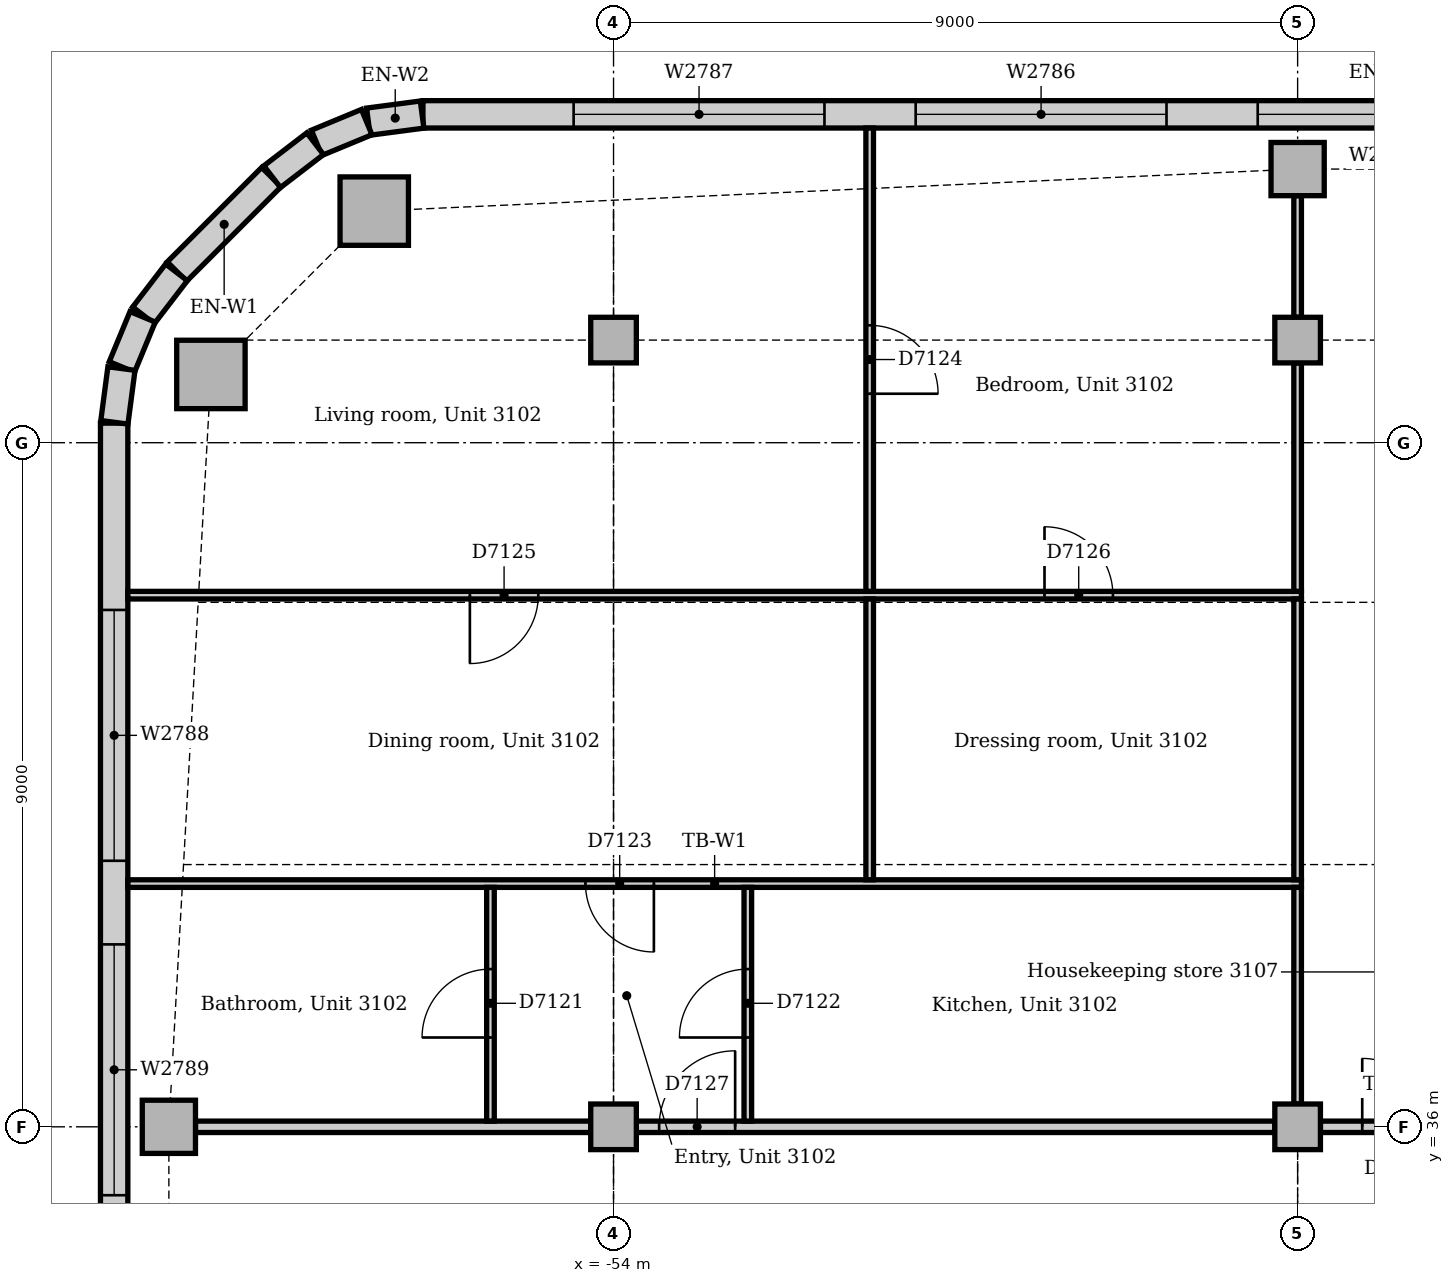
"""IFC4 building model, lengths in metres.
Left out: names, types, materials, properties, quantities, classifications, styles, units other than length and angle.
Written with IfcOpenShell. Run it as: python <this file> out.ifc"""

import sys

from ifc_helpers import new_model, si_unit, direction, frame, frame_2d, origin, origin_2d, place, context, subcontext, project, spatial, rectangle, extrude, element, fill, save


model = new_model("IFC4")
c1 = context("Model", 3, precision=1e-05, world=origin(), true_north=direction((0.0, 1.0)))
c2 = subcontext(c1, "Body", "Model", "MODEL_VIEW")
j1 = project(units=[si_unit("LENGTHUNIT", "METRE"), si_unit("PLANEANGLEUNIT", "RADIAN")], contexts=[c1])
p1 = place(None, origin())
s1 = spatial("IfcSite", under=j1, at=p1, CompositionType="ELEMENT")
p2 = place(p1, origin())
s2 = spatial("IfcBuilding", under=s1, at=p2, CompositionType="ELEMENT")
p3 = place(p2, frame((0.0, 0.0, 132.0)))
s3 = spatial("IfcBuildingStorey", under=s2, at=p3, CompositionType="ELEMENT", Elevation=132.0)
for number, where, z_axis, x_axis in (
    (1, (-57.148, 48.047, 0.0), (0.0, 0.0, 1.0), (1.0, 0.0, 0.0)),
    (2, (-59.297, 45.898, 0.0), (0.0, 0.0, 1.0), (1.0, 0.0, 0.0)),
):
    element("IfcColumn", number, at=place(p3, frame(where, z_axis=z_axis, x_axis=x_axis)), inside=s3, PredefinedType="COLUMN", context=c2, shape_type="SweptSolid", body=[
        extrude(rectangle(XDim=0.9, YDim=0.9, at=origin_2d()), origin(), (0.0, 0.0, 1.0), 3.85),
    ])
for number, where, z_axis, x_axis in (
    (3, (-45.0, 48.6, 0.0), (0.0, 0.0, 1.0), (1.0, 0.0, 0.0)),
    (4, (-59.85, 36.0, 0.0), (0.0, 0.0, 1.0), (1.0, 0.0, 0.0)),
):
    element("IfcColumn", number, at=place(p3, frame(where, z_axis=z_axis, x_axis=x_axis)), inside=s3, PredefinedType="COLUMN", context=c2, shape_type="SweptSolid", body=[
        extrude(rectangle(XDim=0.7, YDim=0.7, at=origin_2d()), origin(), (0.0, 0.0, 1.0), 3.85),
    ])
for number, where, z_axis, x_axis in (
    (5, (-54.0, 36.0, 0.0), (0.0, 0.0, 1.0), (1.0, 0.0, 0.0)),
    (6, (-54.0, 46.35, 0.0), (0.0, 0.0, 1.0), (1.0, 0.0, 0.0)),
    (7, (-45.0, 36.0, 0.0), (0.0, 0.0, 1.0), (1.0, 0.0, 0.0)),
    (8, (-45.0, 46.35, 0.0), (0.0, 0.0, 1.0), (1.0, 0.0, 0.0)),
):
    element("IfcColumn", number, at=place(p3, frame(where, z_axis=z_axis, x_axis=x_axis)), inside=s3, PredefinedType="COLUMN", context=c2, shape_type="SweptSolid", body=[
        extrude(rectangle(XDim=0.6, YDim=0.6, at=origin_2d()), origin(), (0.0, 0.0, 1.0), 3.85),
    ])
p4 = place(p3, frame((-31.243, 49.32, 0.0), z_axis=(0.0, 0.0, 1.0), x_axis=(-1.0, 0.0, 0.0)))
e9 = element("IfcWall", 9, at=p4, inside=s3, PredefinedType="STANDARD", context=c2, shape_type="SweptSolid", body=[
    extrude(rectangle(XDim=25.265, YDim=0.36, at=frame_2d((12.632, 0.0))), origin(), (0.0, 0.0, 1.0), 3.85),
])
p5 = place(p4, frame((1.982, 0.0, 0.9)))
e10 = element("IfcOpeningElement", 10, at=p5, cuts=e9, PredefinedType="OPENING", context=c2, shape_type="SweptSolid", body=[
    extrude(rectangle(XDim=3.3, YDim=1.6, at=frame_2d((1.65, 0.8))), frame((0.0, 0.19, 0.0), z_axis=(0.0, -1.0, 0.0), x_axis=(1.0, 0.0, 0.0)), (0.0, 0.0, 1.0), 0.38),
])
p6 = place(p4, frame((6.482, 0.0, 0.9)))
e11 = element("IfcOpeningElement", 11, at=p6, cuts=e9, PredefinedType="OPENING", context=c2, shape_type="SweptSolid", body=[
    extrude(rectangle(XDim=3.3, YDim=1.6, at=frame_2d((1.65, 0.8))), frame((0.0, 0.19, 0.0), z_axis=(0.0, -1.0, 0.0), x_axis=(1.0, 0.0, 0.0)), (0.0, 0.0, 1.0), 0.38),
])
p7 = place(p4, frame((10.982, 0.0, 0.9)))
e12 = element("IfcOpeningElement", 12, at=p7, cuts=e9, PredefinedType="OPENING", context=c2, shape_type="SweptSolid", body=[
    extrude(rectangle(XDim=3.3, YDim=1.6, at=frame_2d((1.65, 0.8))), frame((0.0, 0.19, 0.0), z_axis=(0.0, -1.0, 0.0), x_axis=(1.0, 0.0, 0.0)), (0.0, 0.0, 1.0), 0.38),
])
p8 = place(p4, frame((15.482, 0.0, 0.9)))
e13 = element("IfcOpeningElement", 13, at=p8, cuts=e9, PredefinedType="OPENING", context=c2, shape_type="SweptSolid", body=[
    extrude(rectangle(XDim=3.3, YDim=1.6, at=frame_2d((1.65, 0.8))), frame((0.0, 0.19, 0.0), z_axis=(0.0, -1.0, 0.0), x_axis=(1.0, 0.0, 0.0)), (0.0, 0.0, 1.0), 0.38),
])
p9 = place(p4, frame((19.982, 0.0, 0.9)))
e14 = element("IfcOpeningElement", 14, at=p9, cuts=e9, PredefinedType="OPENING", context=c2, shape_type="SweptSolid", body=[
    extrude(rectangle(XDim=3.3, YDim=1.6, at=frame_2d((1.65, 0.8))), frame((0.0, 0.19, 0.0), z_axis=(0.0, -1.0, 0.0), x_axis=(1.0, 0.0, 0.0)), (0.0, 0.0, 1.0), 0.38),
])
p10 = place(p3, frame((-58.501, 48.494, 0.0), z_axis=(0.0, 0.0, 1.0), x_axis=(-0.707106781187, -0.707106781187, 0.0)))
e15 = element("IfcWall", 15, at=p10, inside=s3, PredefinedType="STANDARD", context=c2, shape_type="SweptSolid", body=[
    extrude(rectangle(XDim=1.757, YDim=0.36, at=frame_2d((0.879, 0.0))), origin(), (0.0, 0.0, 1.0), 3.85),
])
p11 = place(p3, frame((-60.57, 45.257, 0.0), z_axis=(0.0, 0.0, 1.0), x_axis=(0.0, -1.0, 0.0)))
e16 = element("IfcWall", 16, at=p11, inside=s3, PredefinedType="STANDARD", context=c2, shape_type="SweptSolid", body=[
    extrude(rectangle(XDim=21.515, YDim=0.36, at=frame_2d((10.757, 0.0))), origin(), (0.0, 0.0, 1.0), 3.85),
])
p12 = place(p11, frame((2.457, 0.0, 0.9)))
e17 = element("IfcOpeningElement", 17, at=p12, cuts=e16, PredefinedType="OPENING", context=c2, shape_type="SweptSolid", body=[
    extrude(rectangle(XDim=3.3, YDim=1.6, at=frame_2d((1.65, 0.8))), frame((0.0, 0.19, 0.0), z_axis=(0.0, -1.0, 0.0), x_axis=(1.0, 0.0, 0.0)), (0.0, 0.0, 1.0), 0.38),
])
p13 = place(p11, frame((6.857, 0.0, 0.9)))
e18 = element("IfcOpeningElement", 18, at=p13, cuts=e16, PredefinedType="OPENING", context=c2, shape_type="SweptSolid", body=[
    extrude(rectangle(XDim=3.3, YDim=1.6, at=frame_2d((1.65, 0.8))), frame((0.0, 0.19, 0.0), z_axis=(0.0, -1.0, 0.0), x_axis=(1.0, 0.0, 0.0)), (0.0, 0.0, 1.0), 0.38),
])
p14 = place(p11, frame((11.357, 0.0, 0.9)))
e19 = element("IfcOpeningElement", 19, at=p14, cuts=e16, PredefinedType="OPENING", context=c2, shape_type="SweptSolid", body=[
    extrude(rectangle(XDim=3.3, YDim=1.6, at=frame_2d((1.65, 0.8))), frame((0.0, 0.19, 0.0), z_axis=(0.0, -1.0, 0.0), x_axis=(1.0, 0.0, 0.0)), (0.0, 0.0, 1.0), 0.38),
])
p15 = place(p11, frame((15.857, 0.0, 0.9)))
e20 = element("IfcOpeningElement", 20, at=p15, cuts=e16, PredefinedType="OPENING", context=c2, shape_type="SweptSolid", body=[
    extrude(rectangle(XDim=3.3, YDim=1.6, at=frame_2d((1.65, 0.8))), frame((0.0, 0.19, 0.0), z_axis=(0.0, -1.0, 0.0), x_axis=(1.0, 0.0, 0.0)), (0.0, 0.0, 1.0), 0.38),
])
for number, where, z_axis, x_axis in (
    (21, (-56.519, 49.317, 0.0), (0.0, 0.0, 1.0), (-0.991, -0.131, 0.0)),
    (22, (-57.247, 49.218, 0.0), (0.0, 0.0, 1.0), (-0.924, -0.383, 0.0)),
):
    element("IfcWall", number, at=place(p3, frame(where, z_axis=z_axis, x_axis=x_axis)), inside=s3, PredefinedType="STANDARD", context=c2, shape_type="SweptSolid", body=[
        extrude(rectangle(XDim=0.713, YDim=0.36, at=frame_2d((0.356, 0.0))), origin(), (0.0, 0.0, 1.0), 3.85),
    ])
for number, where, z_axis, x_axis in (
    (23, (-57.925, 48.934, 0.0), (0.0, 0.0, 1.0), (-0.793, -0.609, 0.0)),
    (24, (-59.75, 47.241, 0.0), (0.0, 0.0, 1.0), (-0.609, -0.793, 0.0)),
):
    element("IfcWall", number, at=place(p3, frame(where, z_axis=z_axis, x_axis=x_axis)), inside=s3, PredefinedType="STANDARD", context=c2, shape_type="SweptSolid", body=[
        extrude(rectangle(XDim=0.713, YDim=0.36, at=frame_2d((0.357, 0.0))), origin(), (0.0, 0.0, 1.0), 3.85),
    ])
for number, where, z_axis, x_axis in (
    (25, (-60.195, 46.656, 0.0), (0.0, 0.0, 1.0), (-0.383, -0.924, 0.0)),
    (26, (-60.474, 45.976, 0.0), (0.0, 0.0, 1.0), (-0.131, -0.991, 0.0)),
):
    element("IfcWall", number, at=place(p3, frame(where, z_axis=z_axis, x_axis=x_axis)), inside=s3, PredefinedType="STANDARD", context=c2, shape_type="SweptSolid", body=[
        extrude(rectangle(XDim=0.713, YDim=0.36, at=frame_2d((0.356, 0.0))), origin(), (0.0, 0.0, 1.0), 3.85),
    ])
p16 = place(p3, frame((-44.7, 36.0, 0.0), z_axis=(0.0, 0.0, 1.0), x_axis=(1.0, 0.0, 0.0)))
e27 = element("IfcWall", 27, at=p16, inside=s3, PredefinedType="PARTITIONING", context=c2, shape_type="SweptSolid", body=[
    extrude(rectangle(XDim=1.975, YDim=0.15, at=frame_2d((0.988, 0.0))), origin(), (0.0, 0.0, 1.0), 3.602),
])
p17 = place(p16, frame((0.55, 0.0, 0.0)))
e28 = element("IfcOpeningElement", 28, at=p17, cuts=e27, PredefinedType="OPENING", context=c2, shape_type="SweptSolid", body=[
    extrude(rectangle(XDim=0.9, YDim=2.1, at=frame_2d((0.45, 1.05))), frame((0.0, 0.085, 0.0), z_axis=(0.0, -1.0, 0.0), x_axis=(1.0, 0.0, 0.0)), (0.0, 0.0, 1.0), 0.17),
])
p18 = place(p3, frame((-53.7, 36.0, 0.0), z_axis=(0.0, 0.0, 1.0), x_axis=(1.0, 0.0, 0.0)))
e29 = element("IfcWall", 29, at=p18, inside=s3, PredefinedType="PARTITIONING", context=c2, shape_type="SweptSolid", body=[
    extrude(rectangle(XDim=8.4, YDim=0.15, at=frame_2d((4.2, 0.0))), origin(), (0.0, 0.0, 1.0), 3.262),
])
p19 = place(p18, frame((0.3, 0.0, 0.0)))
e30 = element("IfcOpeningElement", 30, at=p19, cuts=e29, PredefinedType="OPENING", context=c2, shape_type="SweptSolid", body=[
    extrude(rectangle(XDim=1.0, YDim=2.1, at=frame_2d((0.5, 1.05))), frame((0.0, 0.085, 0.0), z_axis=(0.0, -1.0, 0.0), x_axis=(1.0, 0.0, 0.0)), (0.0, 0.0, 1.0), 0.17),
])
p20 = place(p3, frame((-59.5, 36.0, 0.0), z_axis=(0.0, 0.0, 1.0), x_axis=(1.0, 0.0, 0.0)))
e31 = element("IfcWall", 31, at=p20, inside=s3, PredefinedType="PARTITIONING", context=c2, shape_type="SweptSolid", body=[
    extrude(rectangle(XDim=5.2, YDim=0.15, at=frame_2d((2.6, 0.0))), origin(), (0.0, 0.0, 1.0), 3.35),
])
p21 = place(p3, frame((-60.39, 39.2, 0.0), z_axis=(0.0, 0.0, 1.0), x_axis=(1.0, 0.0, 0.0)))
e32 = element("IfcWall", 32, at=p21, inside=s3, PredefinedType="PARTITIONING", context=c2, shape_type="SweptSolid", body=[
    extrude(rectangle(XDim=15.44, YDim=0.1, at=frame_2d((7.72, 0.0))), origin(), (0.0, 0.0, 1.0), 3.85),
])
p22 = place(p21, frame((6.021, 0.0, 0.0)))
e33 = element("IfcOpeningElement", 33, at=p22, cuts=e32, PredefinedType="OPENING", context=c2, shape_type="SweptSolid", body=[
    extrude(rectangle(XDim=0.9, YDim=2.1, at=frame_2d((0.45, 1.05))), frame((0.0, 0.06, 0.0), z_axis=(0.0, -1.0, 0.0), x_axis=(1.0, 0.0, 0.0)), (0.0, 0.0, 1.0), 0.12),
])
p23 = place(p3, frame((-60.39, 42.994, 0.0), z_axis=(0.0, 0.0, 1.0), x_axis=(1.0, 0.0, 0.0)))
e34 = element("IfcWall", 34, at=p23, inside=s3, PredefinedType="PARTITIONING", context=c2, shape_type="SweptSolid", body=[
    extrude(rectangle(XDim=15.44, YDim=0.1, at=frame_2d((7.72, 0.0))), origin(), (0.0, 0.0, 1.0), 3.4),
])
p24 = place(p23, frame((4.5, 0.0, 0.0)))
e35 = element("IfcOpeningElement", 35, at=p24, cuts=e34, PredefinedType="OPENING", context=c2, shape_type="SweptSolid", body=[
    extrude(rectangle(XDim=0.9, YDim=2.1, at=frame_2d((0.45, 1.05))), frame((0.0, 0.06, 0.0), z_axis=(0.0, -1.0, 0.0), x_axis=(1.0, 0.0, 0.0)), (0.0, 0.0, 1.0), 0.12),
])
p25 = place(p23, frame((12.06, 0.0, 0.0)))
e36 = element("IfcOpeningElement", 36, at=p25, cuts=e34, PredefinedType="OPENING", context=c2, shape_type="SweptSolid", body=[
    extrude(rectangle(XDim=0.9, YDim=2.1, at=frame_2d((0.45, 1.05))), frame((0.0, 0.06, 0.0), z_axis=(0.0, -1.0, 0.0), x_axis=(1.0, 0.0, 0.0)), (0.0, 0.0, 1.0), 0.12),
])
p26 = place(p3, frame((-45.0, 43.044, 0.0), z_axis=(0.0, 0.0, 1.0), x_axis=(0.0, 1.0, 0.0)))
e37 = element("IfcWall", 37, at=p26, inside=s3, PredefinedType="PARTITIONING", context=c2, shape_type="SweptSolid", body=[
    extrude(rectangle(XDim=3.006, YDim=0.1, at=frame_2d((1.503, 0.0))), origin(), (0.0, 0.0, 1.0), 3.362),
])
p27 = place(p3, frame((-45.0, 39.25, 0.0), z_axis=(0.0, 0.0, 1.0), x_axis=(0.0, 1.0, 0.0)))
e38 = element("IfcWall", 38, at=p27, inside=s3, PredefinedType="PARTITIONING", context=c2, shape_type="SweptSolid", body=[
    extrude(rectangle(XDim=3.694, YDim=0.1, at=frame_2d((1.847, 0.0))), origin(), (0.0, 0.0, 1.0), 3.362),
])
p28 = place(p3, frame((-45.0, 36.3, 0.0), z_axis=(0.0, 0.0, 1.0), x_axis=(0.0, 1.0, 0.0)))
e39 = element("IfcWall", 39, at=p28, inside=s3, PredefinedType="PARTITIONING", context=c2, shape_type="SweptSolid", body=[
    extrude(rectangle(XDim=2.85, YDim=0.1, at=frame_2d((1.425, 0.0))), origin(), (0.0, 0.0, 1.0), 3.362),
])
p29 = place(p3, frame((-45.0, 46.65, 0.0), z_axis=(0.0, 0.0, 1.0), x_axis=(0.0, 1.0, 0.0)))
e40 = element("IfcWall", 40, at=p29, inside=s3, PredefinedType="PARTITIONING", context=c2, shape_type="SweptSolid", body=[
    extrude(rectangle(XDim=1.6, YDim=0.1, at=frame_2d((0.8, 0.0))), origin(), (0.0, 0.0, 1.0), 3.652),
])
p30 = place(p3, frame((-50.63, 39.25, 0.0), z_axis=(0.0, 0.0, 1.0), x_axis=(0.0, 1.0, 0.0)))
e41 = element("IfcWall", 41, at=p30, inside=s3, PredefinedType="PARTITIONING", context=c2, shape_type="SweptSolid", body=[
    extrude(rectangle(XDim=3.694, YDim=0.1, at=frame_2d((1.847, 0.0))), origin(), (0.0, 0.0, 1.0), 3.85),
])
p31 = place(p3, frame((-50.63, 43.044, 0.0), z_axis=(0.0, 0.0, 1.0), x_axis=(0.0, 1.0, 0.0)))
e42 = element("IfcWall", 42, at=p31, inside=s3, PredefinedType="PARTITIONING", context=c2, shape_type="SweptSolid", body=[
    extrude(rectangle(XDim=6.096, YDim=0.1, at=frame_2d((3.048, 0.0))), origin(), (0.0, 0.0, 1.0), 3.85),
])
p32 = place(p31, frame((2.6, 0.0, 0.0)))
e43 = element("IfcOpeningElement", 43, at=p32, cuts=e42, PredefinedType="OPENING", context=c2, shape_type="SweptSolid", body=[
    extrude(rectangle(XDim=0.9, YDim=2.1, at=frame_2d((0.45, 1.05))), frame((0.0, 0.06, 0.0), z_axis=(0.0, -1.0, 0.0), x_axis=(1.0, 0.0, 0.0)), (0.0, 0.0, 1.0), 0.12),
])
p33 = place(p3, frame((-55.619, 36.075, 0.0), z_axis=(0.0, 0.0, 1.0), x_axis=(0.0, 1.0, 0.0)))
e44 = element("IfcWall", 44, at=p33, inside=s3, PredefinedType="PARTITIONING", context=c2, shape_type="SweptSolid", body=[
    extrude(rectangle(XDim=3.075, YDim=0.1, at=frame_2d((1.538, 0.0))), origin(), (0.0, 0.0, 1.0), 3.85),
])
p34 = place(p33, frame((1.1, 0.0, 0.0)))
e45 = element("IfcOpeningElement", 45, at=p34, cuts=e44, PredefinedType="OPENING", context=c2, shape_type="SweptSolid", body=[
    extrude(rectangle(XDim=0.9, YDim=2.1, at=frame_2d((0.45, 1.05))), frame((0.0, 0.06, 0.0), z_axis=(0.0, -1.0, 0.0), x_axis=(1.0, 0.0, 0.0)), (0.0, 0.0, 1.0), 0.12),
])
p35 = place(p3, frame((-52.233, 36.075, 0.0), z_axis=(0.0, 0.0, 1.0), x_axis=(0.0, 1.0, 0.0)))
e46 = element("IfcWall", 46, at=p35, inside=s3, PredefinedType="PARTITIONING", context=c2, shape_type="SweptSolid", body=[
    extrude(rectangle(XDim=3.075, YDim=0.1, at=frame_2d((1.538, 0.0))), origin(), (0.0, 0.0, 1.0), 3.85),
])
p36 = place(p35, frame((1.1, 0.0, 0.0)))
e47 = element("IfcOpeningElement", 47, at=p36, cuts=e46, PredefinedType="OPENING", context=c2, shape_type="SweptSolid", body=[
    extrude(rectangle(XDim=0.9, YDim=2.1, at=frame_2d((0.45, 1.05))), frame((0.0, 0.06, 0.0), z_axis=(0.0, -1.0, 0.0), x_axis=(1.0, 0.0, 0.0)), (0.0, 0.0, 1.0), 0.12),
])
p37 = place(p7, origin())
e48 = element("IfcWindow", 48, at=p37, inside=s3, PartitioningType="SINGLE_PANEL", PredefinedType="WINDOW", context=c2, shape_type="SweptSolid", body=[
    extrude(rectangle(XDim=3.3, YDim=1.6, at=frame_2d((1.65, 0.8))), frame((0.0, 0.13, 0.0), z_axis=(0.0, -1.0, 0.0), x_axis=(1.0, 0.0, 0.0)), (0.0, 0.0, 1.0), 0.06),
])
fill(e12, e48)
p38 = place(p8, origin())
e49 = element("IfcWindow", 49, at=p38, inside=s3, PartitioningType="SINGLE_PANEL", PredefinedType="WINDOW", context=c2, shape_type="SweptSolid", body=[
    extrude(rectangle(XDim=3.3, YDim=1.6, at=frame_2d((1.65, 0.8))), frame((0.0, 0.13, 0.0), z_axis=(0.0, -1.0, 0.0), x_axis=(1.0, 0.0, 0.0)), (0.0, 0.0, 1.0), 0.06),
])
fill(e13, e49)
p39 = place(p9, origin())
e50 = element("IfcWindow", 50, at=p39, inside=s3, PartitioningType="SINGLE_PANEL", PredefinedType="WINDOW", context=c2, shape_type="SweptSolid", body=[
    extrude(rectangle(XDim=3.3, YDim=1.6, at=frame_2d((1.65, 0.8))), frame((0.0, 0.13, 0.0), z_axis=(0.0, -1.0, 0.0), x_axis=(1.0, 0.0, 0.0)), (0.0, 0.0, 1.0), 0.06),
])
fill(e14, e50)
p40 = place(p12, origin())
e51 = element("IfcWindow", 51, at=p40, inside=s3, PartitioningType="SINGLE_PANEL", PredefinedType="WINDOW", context=c2, shape_type="SweptSolid", body=[
    extrude(rectangle(XDim=3.3, YDim=1.6, at=frame_2d((1.65, 0.8))), frame((0.0, 0.13, 0.0), z_axis=(0.0, -1.0, 0.0), x_axis=(1.0, 0.0, 0.0)), (0.0, 0.0, 1.0), 0.06),
])
fill(e17, e51)
p41 = place(p13, origin())
e52 = element("IfcWindow", 52, at=p41, inside=s3, PartitioningType="SINGLE_PANEL", PredefinedType="WINDOW", context=c2, shape_type="SweptSolid", body=[
    extrude(rectangle(XDim=3.3, YDim=1.6, at=frame_2d((1.65, 0.8))), frame((0.0, 0.13, 0.0), z_axis=(0.0, -1.0, 0.0), x_axis=(1.0, 0.0, 0.0)), (0.0, 0.0, 1.0), 0.06),
])
fill(e18, e52)
p42 = place(p17, origin())
e53 = element("IfcDoor", 53, at=p42, inside=s3, OperationType="SINGLE_SWING_LEFT", PredefinedType="DOOR", context=c2, shape_type="SweptSolid", body=[
    extrude(rectangle(XDim=0.9, YDim=2.1, at=frame_2d((0.45, 1.05))), frame((0.0, 0.025, 0.0), z_axis=(0.0, -1.0, 0.0), x_axis=(1.0, 0.0, 0.0)), (0.0, 0.0, 1.0), 0.05),
])
fill(e28, e53)
p43 = place(p34, origin())
e54 = element("IfcDoor", 54, at=p43, inside=s3, OperationType="SINGLE_SWING_LEFT", PredefinedType="DOOR", context=c2, shape_type="SweptSolid", body=[
    extrude(rectangle(XDim=0.9, YDim=2.1, at=frame_2d((0.45, 1.05))), frame((0.0, 0.025, 0.0), z_axis=(0.0, -1.0, 0.0), x_axis=(1.0, 0.0, 0.0)), (0.0, 0.0, 1.0), 0.05),
])
fill(e45, e54)
p44 = place(p36, origin())
e55 = element("IfcDoor", 55, at=p44, inside=s3, OperationType="SINGLE_SWING_LEFT", PredefinedType="DOOR", context=c2, shape_type="SweptSolid", body=[
    extrude(rectangle(XDim=0.9, YDim=2.1, at=frame_2d((0.45, 1.05))), frame((0.0, 0.025, 0.0), z_axis=(0.0, -1.0, 0.0), x_axis=(1.0, 0.0, 0.0)), (0.0, 0.0, 1.0), 0.05),
])
fill(e47, e55)
p45 = place(p22, frame((0.9, 0.0, 0.0), z_axis=(0.0, 0.0, 1.0), x_axis=(-1.0, 0.0, 0.0)))
e56 = element("IfcDoor", 56, at=p45, inside=s3, OperationType="SINGLE_SWING_LEFT", PredefinedType="DOOR", context=c2, shape_type="SweptSolid", body=[
    extrude(rectangle(XDim=0.9, YDim=2.1, at=frame_2d((0.45, 1.05))), frame((0.0, 0.025, 0.0), z_axis=(0.0, -1.0, 0.0), x_axis=(1.0, 0.0, 0.0)), (0.0, 0.0, 1.0), 0.05),
])
fill(e33, e56)
p46 = place(p32, frame((0.9, 0.0, 0.0), z_axis=(0.0, 0.0, 1.0), x_axis=(-1.0, 0.0, 0.0)))
e57 = element("IfcDoor", 57, at=p46, inside=s3, OperationType="SINGLE_SWING_RIGHT", PredefinedType="DOOR", context=c2, shape_type="SweptSolid", body=[
    extrude(rectangle(XDim=0.9, YDim=2.1, at=frame_2d((0.45, 1.05))), frame((0.0, 0.025, 0.0), z_axis=(0.0, -1.0, 0.0), x_axis=(1.0, 0.0, 0.0)), (0.0, 0.0, 1.0), 0.05),
])
fill(e43, e57)
p47 = place(p24, frame((0.9, 0.0, 0.0), z_axis=(0.0, 0.0, 1.0), x_axis=(-1.0, 0.0, 0.0)))
e58 = element("IfcDoor", 58, at=p47, inside=s3, OperationType="SINGLE_SWING_RIGHT", PredefinedType="DOOR", context=c2, shape_type="SweptSolid", body=[
    extrude(rectangle(XDim=0.9, YDim=2.1, at=frame_2d((0.45, 1.05))), frame((0.0, 0.025, 0.0), z_axis=(0.0, -1.0, 0.0), x_axis=(1.0, 0.0, 0.0)), (0.0, 0.0, 1.0), 0.05),
])
fill(e35, e58)
p48 = place(p25, origin())
e59 = element("IfcDoor", 59, at=p48, inside=s3, OperationType="SINGLE_SWING_LEFT", PredefinedType="DOOR", context=c2, shape_type="SweptSolid", body=[
    extrude(rectangle(XDim=0.9, YDim=2.1, at=frame_2d((0.45, 1.05))), frame((0.0, 0.025, 0.0), z_axis=(0.0, -1.0, 0.0), x_axis=(1.0, 0.0, 0.0)), (0.0, 0.0, 1.0), 0.05),
])
fill(e36, e59)
p49 = place(p19, origin())
e60 = element("IfcDoor", 60, at=p49, inside=s3, OperationType="SINGLE_SWING_RIGHT", PredefinedType="DOOR", context=c2, shape_type="SweptSolid", body=[
    extrude(rectangle(XDim=1.0, YDim=2.1, at=frame_2d((0.5, 1.05))), frame((0.0, 0.025, 0.0), z_axis=(0.0, -1.0, 0.0), x_axis=(1.0, 0.0, 0.0)), (0.0, 0.0, 1.0), 0.05),
])
fill(e30, e60)
save(model, sys.argv[1])
